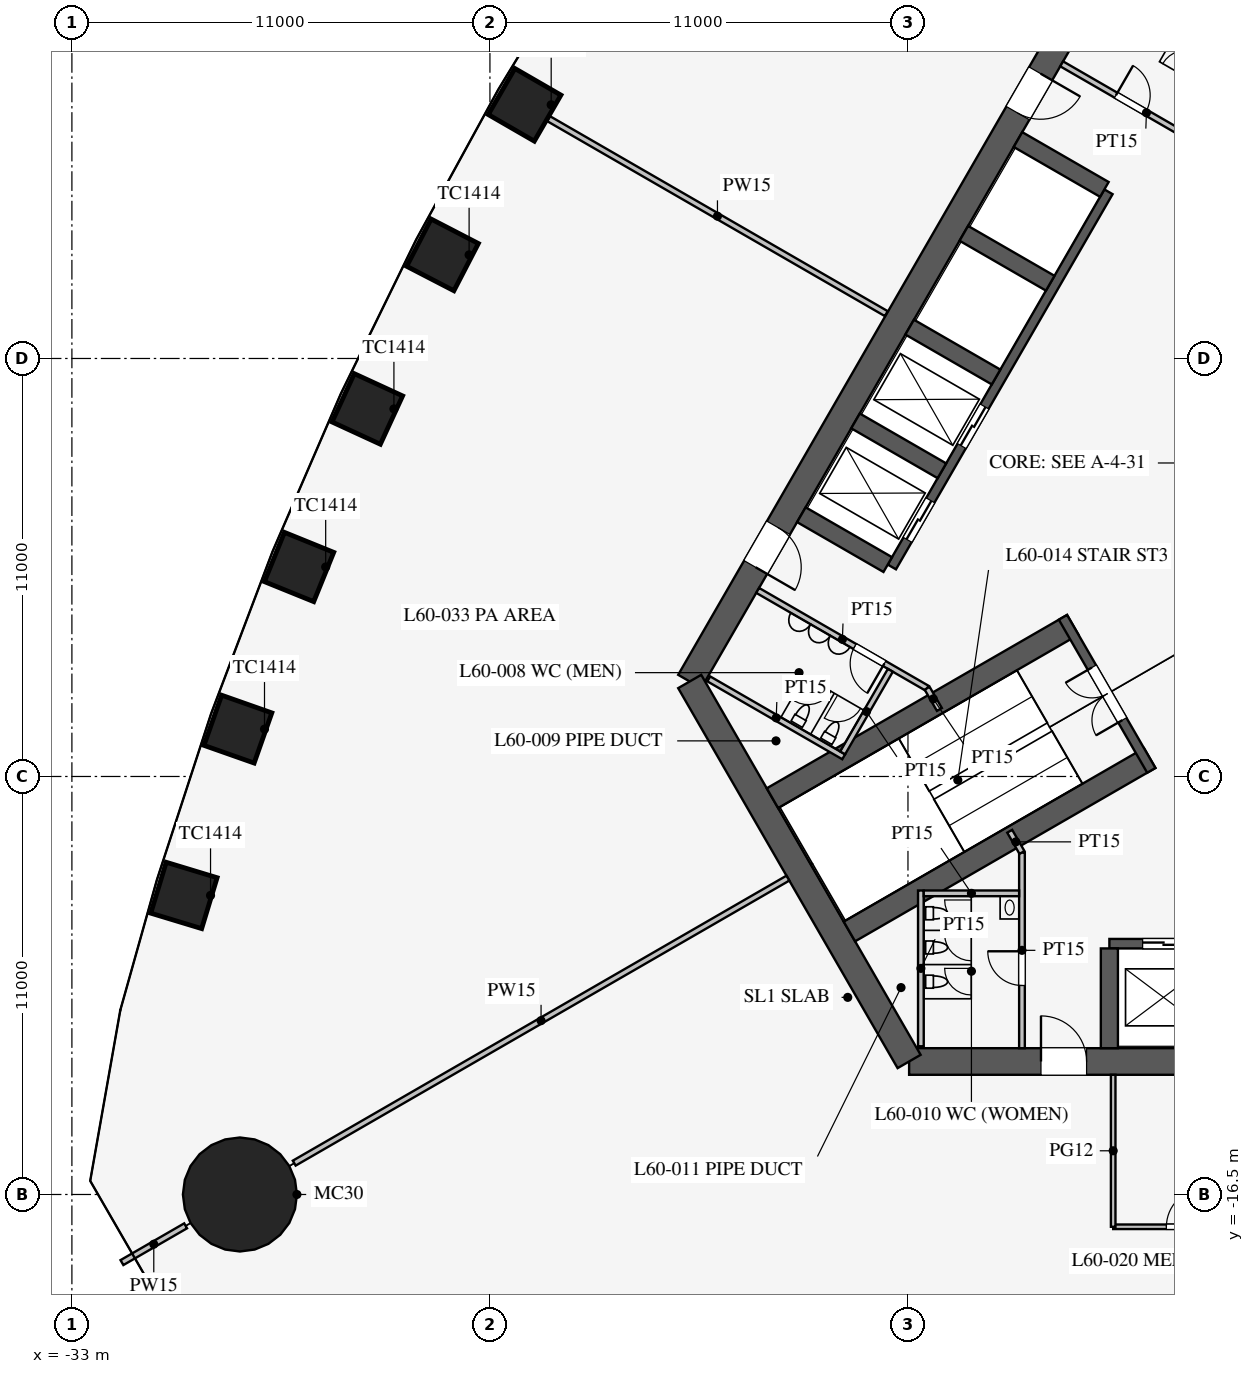
"""IFC4 building model, lengths in metres.
Left out: names, types, materials, properties, quantities, classifications, styles, units other than length and angle.
Written with IfcOpenShell. Run it as: python <this file> out.ifc"""

import sys

from ifc_helpers import new_model, si_unit, direction, frame, frame_2d, origin, origin_2d, place, context, subcontext, project, spatial, rectangle, circle, extrude, element, fill, save


model = new_model("IFC4")
c1 = context("Model", 3, precision=1e-05, world=origin(), true_north=direction((0.0, 1.0)))
c2 = subcontext(c1, "Body", "Model", "MODEL_VIEW")
j1 = project(units=[si_unit("LENGTHUNIT", "METRE"), si_unit("PLANEANGLEUNIT", "RADIAN")], contexts=[c1])
p1 = place(None, origin())
s1 = spatial("IfcSite", under=j1, at=p1, CompositionType="ELEMENT")
p2 = place(p1, origin())
s2 = spatial("IfcBuilding", under=s1, at=p2, CompositionType="ELEMENT")
p3 = place(p2, frame((0.0, 0.0, 261.1)))
s3 = spatial("IfcBuildingStorey", under=s2, at=p3, CompositionType="ELEMENT", Elevation=261.1)
for number, where, z_axis, x_axis in (
    (1, (-21.088, 12.175, 0.0), (0.0, 0.0, 1.0), (-0.5, -0.866, 0.0)),
    (2, (-23.248, 8.226, 0.0), (0.0, 0.0, 1.0), (-0.46, -0.888, 0.0)),
    (3, (-25.227, 4.172, 0.0), (0.0, 0.0, 1.0), (-0.418, -0.908, 0.0)),
    (4, (-27.022, 0.013, 0.0), (0.0, 0.0, 1.0), (-0.376, -0.927, 0.0)),
    (5, (-28.632, -4.254, 0.0), (0.0, 0.0, 1.0), (-0.332, -0.943, 0.0)),
    (6, (-30.052, -8.63, 0.0), (0.0, 0.0, 1.0), (-0.29, -0.957, 0.0)),
):
    element("IfcColumn", number, at=place(p3, frame(where, z_axis=z_axis, x_axis=x_axis)), inside=s3, PredefinedType="COLUMN", context=c2, shape_type="SweptSolid", body=[
        extrude(rectangle(XDim=1.4, YDim=1.4, at=origin_2d()), origin(), (0.0, 0.0, 1.0), 4.2),
    ])
p4 = place(p3, frame((-28.579, -16.5, 0.0), z_axis=(0.0, 0.0, 1.0), x_axis=(1.0, 0.0, 0.0)))
e7 = element("IfcColumn", 7, at=p4, inside=s3, PredefinedType="COLUMN", context=c2, shape_type="SweptSolid", body=[
    extrude(circle(Radius=1.5, at=origin_2d()), origin(), (0.0, 0.0, 1.0), 4.2),
])
p5 = place(p3, frame((-10.97, -13.0, 0.0), z_axis=(0.0, 0.0, 1.0), x_axis=(1.0, 0.0, 0.0)))
e8 = element("IfcWall", 8, at=p5, inside=s3, PredefinedType="SHEAR", context=c2, shape_type="SweptSolid", body=[
    extrude(rectangle(XDim=21.939, YDim=0.7, at=frame_2d((10.97, 0.0))), origin(), (0.0, 0.0, 1.0), 4.2),
])
p6 = place(p5, frame((17.27, 0.0, 0.0)))
e9 = element("IfcOpeningElement", 9, at=p6, cuts=e8, PredefinedType="OPENING", context=c2, shape_type="SweptSolid", body=[
    extrude(rectangle(XDim=1.2, YDim=2.1, at=frame_2d((0.6, 1.05))), frame((0.0, 0.36, 0.0), z_axis=(0.0, -1.0, 0.0), x_axis=(1.0, 0.0, 0.0)), (0.0, 0.0, 1.0), 0.72),
])
p7 = place(p5, frame((3.47, 0.0, 0.0)))
e10 = element("IfcOpeningElement", 10, at=p7, cuts=e8, PredefinedType="OPENING", context=c2, shape_type="SweptSolid", body=[
    extrude(rectangle(XDim=1.2, YDim=2.1, at=frame_2d((0.6, 1.05))), frame((0.0, 0.36, 0.0), z_axis=(0.0, -1.0, 0.0), x_axis=(1.0, 0.0, 0.0)), (0.0, 0.0, 1.0), 0.72),
])
p8 = place(p3, frame((-5.773, 16.0, 0.0), z_axis=(0.0, 0.0, 1.0), x_axis=(-0.500002442456, -0.866023993627, 0.0)))
e11 = element("IfcWall", 11, at=p8, inside=s3, PredefinedType="SHEAR", context=c2, shape_type="SweptSolid", body=[
    extrude(rectangle(XDim=21.939, YDim=0.7, at=frame_2d((10.97, 0.0))), origin(), (0.0, 0.0, 1.0), 4.2),
])
p9 = place(p8, frame((17.27, 0.0, 0.0)))
e12 = element("IfcOpeningElement", 12, at=p9, cuts=e11, PredefinedType="OPENING", context=c2, shape_type="SweptSolid", body=[
    extrude(rectangle(XDim=1.2, YDim=2.1, at=frame_2d((0.6, 1.05))), frame((0.0, 0.36, 0.0), z_axis=(0.0, -1.0, 0.0), x_axis=(1.0, 0.0, 0.0)), (0.0, 0.0, 1.0), 0.72),
])
p10 = place(p8, frame((3.47, 0.0, 0.0)))
e13 = element("IfcOpeningElement", 13, at=p10, cuts=e11, PredefinedType="OPENING", context=c2, shape_type="SweptSolid", body=[
    extrude(rectangle(XDim=1.2, YDim=2.1, at=frame_2d((0.6, 1.05))), frame((0.0, 0.36, 0.0), z_axis=(0.0, -1.0, 0.0), x_axis=(1.0, 0.0, 0.0)), (0.0, 0.0, 1.0), 0.72),
])
p11 = place(p3, frame((-16.743, -3.0, 0.0), z_axis=(0.0, 0.0, 1.0), x_axis=(0.499995765644, -0.866027848477, 0.0)))
e14 = element("IfcWall", 14, at=p11, inside=s3, PredefinedType="SHEAR", context=c2, shape_type="SweptSolid", body=[
    extrude(rectangle(XDim=11.547, YDim=0.7, at=frame_2d((5.773, 0.0))), origin(), (0.0, 0.0, 1.0), 4.2),
])
p12 = place(p3, frame((-5.7, -9.9, 0.0), z_axis=(0.0, 0.0, 1.0), x_axis=(1.0, 0.0, 0.0)))
e15 = element("IfcWall", 15, at=p12, inside=s3, PredefinedType="SHEAR", context=c2, shape_type="SweptSolid", body=[
    extrude(rectangle(XDim=11.4, YDim=0.25, at=frame_2d((5.7, 0.0))), origin(), (0.0, 0.0, 1.0), 4.2),
])
p13 = place(p12, frame((0.875, 0.0, 0.0)))
e16 = element("IfcOpeningElement", 16, at=p13, cuts=e15, PredefinedType="OPENING", context=c2, shape_type="SweptSolid", body=[
    extrude(rectangle(XDim=1.1, YDim=2.2, at=frame_2d((0.55, 1.1))), frame((0.0, 0.135, 0.0), z_axis=(0.0, -1.0, 0.0), x_axis=(1.0, 0.0, 0.0)), (0.0, 0.0, 1.0), 0.27),
])
p14 = place(p12, frame((3.725, 0.0, 0.0)))
e17 = element("IfcOpeningElement", 17, at=p14, cuts=e15, PredefinedType="OPENING", context=c2, shape_type="SweptSolid", body=[
    extrude(rectangle(XDim=1.1, YDim=2.2, at=frame_2d((0.55, 1.1))), frame((0.0, 0.135, 0.0), z_axis=(0.0, -1.0, 0.0), x_axis=(1.0, 0.0, 0.0)), (0.0, 0.0, 1.0), 0.27),
])
p15 = place(p12, frame((6.575, 0.0, 0.0)))
e18 = element("IfcOpeningElement", 18, at=p15, cuts=e15, PredefinedType="OPENING", context=c2, shape_type="SweptSolid", body=[
    extrude(rectangle(XDim=1.1, YDim=2.2, at=frame_2d((0.55, 1.1))), frame((0.0, 0.135, 0.0), z_axis=(0.0, -1.0, 0.0), x_axis=(1.0, 0.0, 0.0)), (0.0, 0.0, 1.0), 0.27),
])
p16 = place(p12, frame((9.425, 0.0, 0.0)))
e19 = element("IfcOpeningElement", 19, at=p16, cuts=e15, PredefinedType="OPENING", context=c2, shape_type="SweptSolid", body=[
    extrude(rectangle(XDim=1.1, YDim=2.2, at=frame_2d((0.55, 1.1))), frame((0.0, 0.135, 0.0), z_axis=(0.0, -1.0, 0.0), x_axis=(1.0, 0.0, 0.0)), (0.0, 0.0, 1.0), 0.27),
])
p17 = place(p3, frame((-5.7, -10.025, 0.0), z_axis=(0.0, 0.0, 1.0), x_axis=(0.0, -1.0, 0.0)))
e20 = element("IfcWall", 20, at=p17, inside=s3, PredefinedType="SHEAR", context=c2, shape_type="SweptSolid", body=[
    extrude(rectangle(XDim=2.625, YDim=0.45, at=frame_2d((1.312, 0.0))), origin(), (0.0, 0.0, 1.0), 4.2),
])
p18 = place(p3, frame((-5.724, 9.886, 0.0), z_axis=(0.0, 0.0, 1.0), x_axis=(-0.500001763848, -0.866024385424, 0.0)))
e21 = element("IfcWall", 21, at=p18, inside=s3, PredefinedType="SHEAR", context=c2, shape_type="SweptSolid", body=[
    extrude(rectangle(XDim=11.4, YDim=0.25, at=frame_2d((5.7, 0.0))), origin(), (0.0, 0.0, 1.0), 4.2),
])
p19 = place(p18, frame((6.525, 0.0, 0.0)))
e22 = element("IfcOpeningElement", 22, at=p19, cuts=e21, PredefinedType="OPENING", context=c2, shape_type="SweptSolid", body=[
    extrude(rectangle(XDim=1.2, YDim=2.2, at=frame_2d((0.6, 1.1))), frame((0.0, 0.135, 0.0), z_axis=(0.0, -1.0, 0.0), x_axis=(1.0, 0.0, 0.0)), (0.0, 0.0, 1.0), 0.27),
])
p20 = place(p18, frame((9.375, 0.0, 0.0)))
e23 = element("IfcOpeningElement", 23, at=p20, cuts=e21, PredefinedType="OPENING", context=c2, shape_type="SweptSolid", body=[
    extrude(rectangle(XDim=1.2, YDim=2.2, at=frame_2d((0.6, 1.1))), frame((0.0, 0.135, 0.0), z_axis=(0.0, -1.0, 0.0), x_axis=(1.0, 0.0, 0.0)), (0.0, 0.0, 1.0), 0.27),
])
for number, where, z_axis, x_axis in (
    (24, (-5.832, 9.949, 0.0), (0.0, 0.0, 1.0), (-0.866, 0.5, 0.0)),
    (25, (-7.257, 7.481, 0.0), (0.0, 0.0, 1.0), (-0.866, 0.5, 0.0)),
    (26, (-8.682, 5.012, 0.0), (0.0, 0.0, 1.0), (-0.866, 0.5, 0.0)),
    (27, (-10.107, 2.544, 0.0), (0.0, 0.0, 1.0), (-0.866, 0.5, 0.0)),
    (28, (-11.532, 0.076, 0.0), (0.0, 0.0, 1.0), (-0.866, 0.5, 0.0)),
):
    element("IfcWall", number, at=place(p3, frame(where, z_axis=z_axis, x_axis=x_axis)), inside=s3, PredefinedType="SHEAR", context=c2, shape_type="SweptSolid", body=[
        extrude(rectangle(XDim=2.625, YDim=0.45, at=frame_2d((1.312, 0.0))), origin(), (0.0, 0.0, 1.0), 4.2),
    ])
for number, where, z_axis, x_axis in (
    (29, (-6.663, -1.509, 0.0), (0.0, 0.0, 1.0), (-0.866, -0.5, 0.0)),
    (30, (-4.638, -5.016, 0.0), (0.0, 0.0, 1.0), (-0.866, -0.5, 0.0)),
):
    element("IfcWall", number, at=place(p3, frame(where, z_axis=z_axis, x_axis=x_axis)), inside=s3, PredefinedType="SHEAR", context=c2, shape_type="SweptSolid", body=[
        extrude(rectangle(XDim=9.125, YDim=0.6, at=frame_2d((4.562, 0.0))), origin(), (0.0, 0.0, 1.0), 4.2),
    ])
p21 = place(p3, frame((-6.922, -1.312, 0.0), z_axis=(0.0, 0.0, 1.0), x_axis=(0.499984536904, -0.866034331223, 0.0)))
e31 = element("IfcWall", 31, at=p21, inside=s3, PredefinedType="SHEAR", context=c2, shape_type="SweptSolid", body=[
    extrude(rectangle(XDim=4.65, YDim=0.25, at=frame_2d((2.325, 0.0))), origin(), (0.0, 0.0, 1.0), 4.2),
])
p22 = place(p21, frame((1.525, 0.0, 0.0)))
e32 = element("IfcOpeningElement", 32, at=p22, cuts=e31, PredefinedType="OPENING", context=c2, shape_type="SweptSolid", body=[
    extrude(rectangle(XDim=1.6, YDim=2.1, at=frame_2d((0.8, 1.05))), frame((0.0, 0.135, 0.0), z_axis=(0.0, -1.0, 0.0), x_axis=(1.0, 0.0, 0.0)), (0.0, 0.0, 1.0), 0.27),
])
p23 = place(p3, frame((-8.0, -7.5, 0.0), z_axis=(0.0, 0.0, 1.0), x_axis=(0.0, -1.0, 0.0)))
e33 = element("IfcWall", 33, at=p23, inside=s3, PredefinedType="PARTITIONING", context=c2, shape_type="SweptSolid", body=[
    extrude(rectangle(XDim=5.15, YDim=0.15, at=frame_2d((2.575, 0.0))), origin(), (0.0, 0.0, 1.0), 3.95),
])
p24 = place(p23, frame((2.6, 0.0, 0.0)))
e34 = element("IfcOpeningElement", 34, at=p24, cuts=e33, PredefinedType="OPENING", context=c2, shape_type="SweptSolid", body=[
    extrude(rectangle(XDim=0.9, YDim=2.1, at=frame_2d((0.45, 1.05))), frame((0.0, 0.085, 0.0), z_axis=(0.0, -1.0, 0.0), x_axis=(1.0, 0.0, 0.0)), (0.0, 0.0, 1.0), 0.17),
])
p25 = place(p3, frame((-10.495, -3.178, 0.0), z_axis=(0.0, 0.0, 1.0), x_axis=(-0.866037967349, 0.499978238636, 0.0)))
e35 = element("IfcWall", 35, at=p25, inside=s3, PredefinedType="PARTITIONING", context=c2, shape_type="SweptSolid", body=[
    extrude(rectangle(XDim=5.15, YDim=0.15, at=frame_2d((2.575, 0.0))), origin(), (0.0, 0.0, 1.0), 3.95),
])
p26 = place(p25, frame((1.3, 0.0, 0.0)))
e36 = element("IfcOpeningElement", 36, at=p26, cuts=e35, PredefinedType="OPENING", context=c2, shape_type="SweptSolid", body=[
    extrude(rectangle(XDim=0.9, YDim=2.1, at=frame_2d((0.45, 1.05))), frame((0.0, 0.085, 0.0), z_axis=(0.0, -1.0, 0.0), x_axis=(1.0, 0.0, 0.0)), (0.0, 0.0, 1.0), 0.17),
])
p27 = place(p3, frame((-2.495, 10.678, 0.0), z_axis=(0.0, 0.0, 1.0), x_axis=(-0.866037967349, 0.499978238636, 0.0)))
e37 = element("IfcWall", 37, at=p27, inside=s3, PredefinedType="PARTITIONING", context=c2, shape_type="SweptSolid", body=[
    extrude(rectangle(XDim=5.15, YDim=0.15, at=frame_2d((2.575, 0.0))), origin(), (0.0, 0.0, 1.0), 3.95),
])
p28 = place(p27, frame((2.6, 0.0, 0.0)))
e38 = element("IfcOpeningElement", 38, at=p28, cuts=e37, PredefinedType="OPENING", context=c2, shape_type="SweptSolid", body=[
    extrude(rectangle(XDim=0.9, YDim=2.1, at=frame_2d((0.45, 1.05))), frame((0.0, 0.085, 0.0), z_axis=(0.0, -1.0, 0.0), x_axis=(1.0, 0.0, 0.0)), (0.0, 0.0, 1.0), 0.17),
])
for number, where, z_axis, x_axis in (
    (39, (-10.495, -3.178, 0.0), (0.0, 0.0, 1.0), (0.5, -0.866, 0.0)),
    (40, (-8.0, -7.5, 0.0), (0.0, 0.0, 1.0), (-0.5, 0.866, 0.0)),
):
    element("IfcWall", number, at=place(p3, frame(where, z_axis=z_axis, x_axis=x_axis)), inside=s3, PredefinedType="PARTITIONING", context=c2, shape_type="SweptSolid", body=[
        extrude(rectangle(XDim=0.645, YDim=0.15, at=frame_2d((0.323, 0.0))), origin(), (0.0, 0.0, 1.0), 3.95),
    ])
p29 = place(p3, frame((-12.691, -4.982, 0.0), z_axis=(0.0, 0.0, 1.0), x_axis=(-0.8660249478, 0.500000789788, 0.0)))
e41 = element("IfcWall", 41, at=p29, inside=s3, PredefinedType="PARTITIONING", context=c2, shape_type="SweptSolid", body=[
    extrude(rectangle(XDim=4.1, YDim=0.15, at=frame_2d((2.05, 0.0))), origin(), (0.0, 0.0, 1.0), 3.95),
])
p30 = place(p3, frame((-11.464, -2.706, 0.0), z_axis=(0.0, 0.0, 1.0), x_axis=(-0.50001992892, -0.866013897511, 0.0)))
e42 = element("IfcWall", 42, at=p30, inside=s3, PredefinedType="PARTITIONING", context=c2, shape_type="SweptSolid", body=[
    extrude(rectangle(XDim=2.51, YDim=0.15, at=frame_2d((1.255, 0.0))), origin(), (0.0, 0.0, 1.0), 3.95),
])
p31 = place(p3, frame((-10.66, -8.5, 0.0), z_axis=(0.0, 0.0, 1.0), x_axis=(0.0, -1.0, 0.0)))
e43 = element("IfcWall", 43, at=p31, inside=s3, PredefinedType="PARTITIONING", context=c2, shape_type="SweptSolid", body=[
    extrude(rectangle(XDim=4.1, YDim=0.15, at=frame_2d((2.05, 0.0))), origin(), (0.0, 0.0, 1.0), 3.95),
])
p32 = place(p3, frame((-8.075, -8.575, 0.0), z_axis=(0.0, 0.0, 1.0), x_axis=(-1.0, 0.0, 0.0)))
e44 = element("IfcWall", 44, at=p32, inside=s3, PredefinedType="PARTITIONING", context=c2, shape_type="SweptSolid", body=[
    extrude(rectangle(XDim=2.51, YDim=0.15, at=frame_2d((1.255, 0.0))), origin(), (0.0, 0.0, 1.0), 3.95),
])
p33 = place(p3, frame((-14.159, -8.175, 0.0), z_axis=(0.0, 0.0, 1.0), x_axis=(-0.866027028085, -0.499997186618, 0.0)))
e45 = element("IfcWall", 45, at=p33, inside=s3, PredefinedType="PARTITIONING", context=c2, shape_type="SweptSolid", body=[
    extrude(rectangle(XDim=15.0, YDim=0.15, at=frame_2d((7.5, 0.0))), origin(), (0.0, 0.0, 1.0), 1.95),
])
p34 = place(p3, frame((-30.008, -17.325, 0.0), z_axis=(0.0, 0.0, 1.0), x_axis=(-0.866013246922, -0.500021055713, 0.0)))
e46 = element("IfcWall", 46, at=p34, inside=s3, PredefinedType="PARTITIONING", context=c2, shape_type="SweptSolid", body=[
    extrude(rectangle(XDim=1.935, YDim=0.15, at=frame_2d((0.967, 0.0))), origin(), (0.0, 0.0, 1.0), 1.95),
])
p35 = place(p3, frame((-5.6, -17.35, 0.0), z_axis=(0.0, 0.0, 1.0), x_axis=(1.0, 0.0, 0.0)))
e47 = element("IfcWall", 47, at=p35, inside=s3, PredefinedType="PARTITIONING", context=c2, shape_type="SweptSolid", body=[
    extrude(rectangle(XDim=3.6, YDim=0.12, at=frame_2d((1.8, 0.0))), origin(), (0.0, 0.0, 1.0), 2.9),
])
p36 = place(p35, frame((1.4, 0.0, 0.15)))
e48 = element("IfcOpeningElement", 48, at=p36, cuts=e47, PredefinedType="OPENING", context=c2, shape_type="SweptSolid", body=[
    extrude(rectangle(XDim=1.0, YDim=2.1, at=frame_2d((0.5, 1.05))), frame((0.0, 0.07, 0.0), z_axis=(0.0, -1.0, 0.0), x_axis=(1.0, 0.0, 0.0)), (0.0, 0.0, 1.0), 0.14),
])
p37 = place(p3, frame((-5.6, -13.35, 0.0), z_axis=(0.0, 0.0, 1.0), x_axis=(0.0, -1.0, 0.0)))
e49 = element("IfcWall", 49, at=p37, inside=s3, PredefinedType="PARTITIONING", context=c2, shape_type="SweptSolid", body=[
    extrude(rectangle(XDim=4.0, YDim=0.12, at=frame_2d((2.0, 0.0))), origin(), (0.0, 0.0, 1.0), 2.9),
])
p38 = place(p3, frame((-11.57, 6.68, 0.0), z_axis=(0.0, 0.0, 1.0), x_axis=(-0.866023526028, 0.500003252355, 0.0)))
e50 = element("IfcWall", 50, at=p38, inside=s3, PredefinedType="PARTITIONING", context=c2, shape_type="SweptSolid", body=[
    extrude(rectangle(XDim=10.261, YDim=0.15, at=frame_2d((5.13, 0.0))), origin(), (0.0, 0.0, 1.0), 2.35),
])
p39 = place(p24, frame((0.9, 0.0, 0.0), z_axis=(0.0, 0.0, 1.0), x_axis=(-1.0, 0.0, 0.0)))
e51 = element("IfcDoor", 51, at=p39, inside=s3, OperationType="SINGLE_SWING_RIGHT", PredefinedType="DOOR", context=c2, shape_type="SweptSolid", body=[
    extrude(rectangle(XDim=0.9, YDim=2.1, at=frame_2d((0.45, 1.05))), frame((0.0, 0.025, 0.0), z_axis=(0.0, -1.0, 0.0), x_axis=(1.0, 0.0, 0.0)), (0.0, 0.0, 1.0), 0.05),
])
fill(e34, e51)
p40 = place(p26, origin())
e52 = element("IfcDoor", 52, at=p40, inside=s3, OperationType="SINGLE_SWING_LEFT", PredefinedType="DOOR", context=c2, shape_type="SweptSolid", body=[
    extrude(rectangle(XDim=0.9, YDim=2.1, at=frame_2d((0.45, 1.05))), frame((0.0, 0.025, 0.0), z_axis=(0.0, -1.0, 0.0), x_axis=(1.0, 0.0, 0.0)), (0.0, 0.0, 1.0), 0.05),
])
fill(e36, e52)
p41 = place(p28, frame((0.9, 0.0, 0.0), z_axis=(0.0, 0.0, 1.0), x_axis=(-1.0, 0.0, 0.0)))
e53 = element("IfcDoor", 53, at=p41, inside=s3, OperationType="SINGLE_SWING_LEFT", PredefinedType="DOOR", context=c2, shape_type="SweptSolid", body=[
    extrude(rectangle(XDim=0.9, YDim=2.1, at=frame_2d((0.45, 1.05))), frame((0.0, 0.025, 0.0), z_axis=(0.0, -1.0, 0.0), x_axis=(1.0, 0.0, 0.0)), (0.0, 0.0, 1.0), 0.05),
])
fill(e38, e53)
p42 = place(p22, frame((1.6, 0.0, 0.0), z_axis=(0.0, 0.0, 1.0), x_axis=(-1.0, 0.0, 0.0)))
e54 = element("IfcDoor", 54, at=p42, inside=s3, OperationType="DOUBLE_DOOR_SINGLE_SWING", PredefinedType="DOOR", context=c2, shape_type="SweptSolid", body=[
    extrude(rectangle(XDim=1.6, YDim=2.1, at=frame_2d((0.8, 1.05))), frame((0.0, 0.025, 0.0), z_axis=(0.0, -1.0, 0.0), x_axis=(1.0, 0.0, 0.0)), (0.0, 0.0, 1.0), 0.05),
])
fill(e32, e54)
p43 = place(p7, origin())
e55 = element("IfcDoor", 55, at=p43, inside=s3, OperationType="SINGLE_SWING_LEFT", PredefinedType="DOOR", context=c2, shape_type="SweptSolid", body=[
    extrude(rectangle(XDim=1.2, YDim=2.1, at=frame_2d((0.6, 1.05))), frame((0.0, 0.025, 0.0), z_axis=(0.0, -1.0, 0.0), x_axis=(1.0, 0.0, 0.0)), (0.0, 0.0, 1.0), 0.05),
])
fill(e10, e55)
p44 = place(p9, origin())
e56 = element("IfcDoor", 56, at=p44, inside=s3, OperationType="SINGLE_SWING_RIGHT", PredefinedType="DOOR", context=c2, shape_type="SweptSolid", body=[
    extrude(rectangle(XDim=1.2, YDim=2.1, at=frame_2d((0.6, 1.05))), frame((0.0, 0.025, 0.0), z_axis=(0.0, -1.0, 0.0), x_axis=(1.0, 0.0, 0.0)), (0.0, 0.0, 1.0), 0.05),
])
fill(e12, e56)
p45 = place(p10, origin())
e57 = element("IfcDoor", 57, at=p45, inside=s3, OperationType="SINGLE_SWING_LEFT", PredefinedType="DOOR", context=c2, shape_type="SweptSolid", body=[
    extrude(rectangle(XDim=1.2, YDim=2.1, at=frame_2d((0.6, 1.05))), frame((0.0, 0.025, 0.0), z_axis=(0.0, -1.0, 0.0), x_axis=(1.0, 0.0, 0.0)), (0.0, 0.0, 1.0), 0.05),
])
fill(e13, e57)
p46 = place(p36, origin())
e58 = element("IfcDoor", 58, at=p46, inside=s3, OperationType="SINGLE_SWING_RIGHT", PredefinedType="DOOR", context=c2, shape_type="SweptSolid", body=[
    extrude(rectangle(XDim=1.0, YDim=2.1, at=frame_2d((0.5, 1.05))), frame((0.0, 0.025, 0.0), z_axis=(0.0, -1.0, 0.0), x_axis=(1.0, 0.0, 0.0)), (0.0, 0.0, 1.0), 0.05),
])
fill(e48, e58)
p47 = place(p13, origin())
e59 = element("IfcDoor", 59, at=p47, inside=s3, OperationType="DOUBLE_DOOR_SLIDING", PredefinedType="DOOR", context=c2, shape_type="SweptSolid", body=[
    extrude(rectangle(XDim=1.1, YDim=2.2, at=frame_2d((0.55, 1.1))), frame((0.0, 0.025, 0.0), z_axis=(0.0, -1.0, 0.0), x_axis=(1.0, 0.0, 0.0)), (0.0, 0.0, 1.0), 0.05),
])
fill(e16, e59)
p48 = place(p19, origin())
e60 = element("IfcDoor", 60, at=p48, inside=s3, OperationType="DOUBLE_DOOR_SLIDING", PredefinedType="DOOR", context=c2, shape_type="SweptSolid", body=[
    extrude(rectangle(XDim=1.2, YDim=2.2, at=frame_2d((0.6, 1.1))), frame((0.0, 0.025, 0.0), z_axis=(0.0, -1.0, 0.0), x_axis=(1.0, 0.0, 0.0)), (0.0, 0.0, 1.0), 0.05),
])
fill(e22, e60)
p49 = place(p20, origin())
e61 = element("IfcDoor", 61, at=p49, inside=s3, OperationType="DOUBLE_DOOR_SLIDING", PredefinedType="DOOR", context=c2, shape_type="SweptSolid", body=[
    extrude(rectangle(XDim=1.2, YDim=2.2, at=frame_2d((0.6, 1.1))), frame((0.0, 0.025, 0.0), z_axis=(0.0, -1.0, 0.0), x_axis=(1.0, 0.0, 0.0)), (0.0, 0.0, 1.0), 0.05),
])
fill(e23, e61)
save(model, sys.argv[1])
